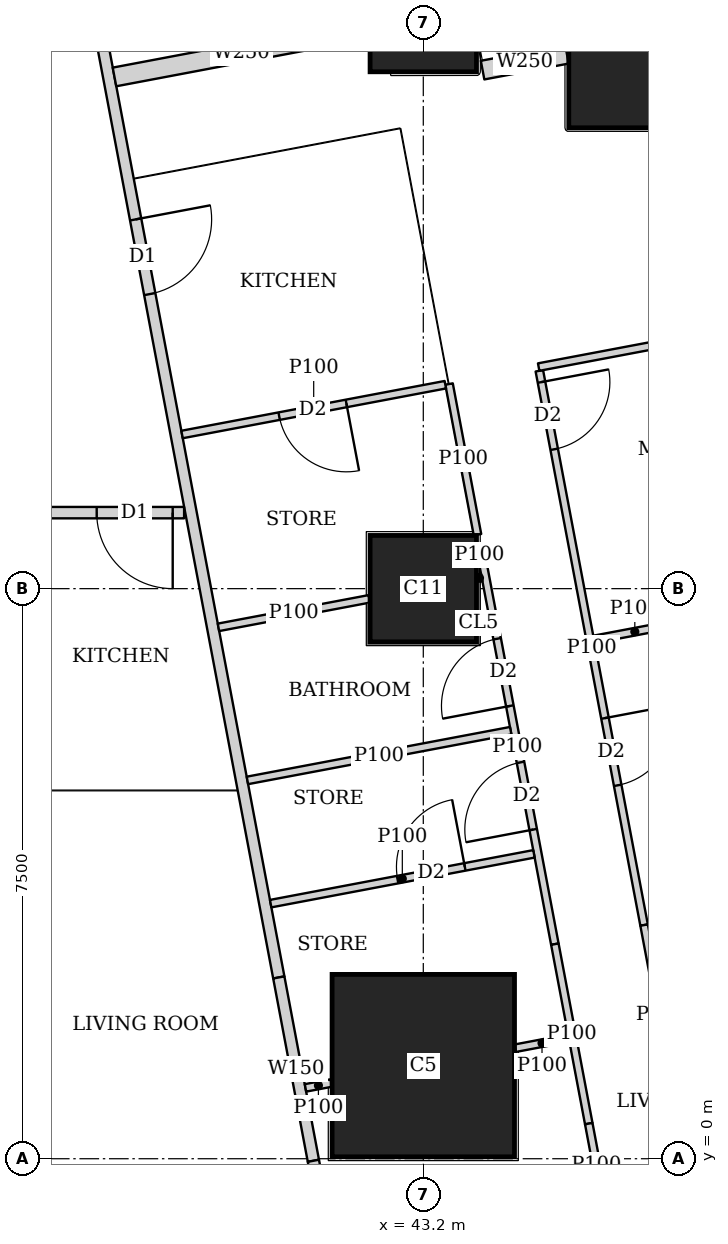
"""IFC4 building model, lengths in metres.
Left out: names, types, materials, properties, quantities, classifications, styles, units other than length and angle.
Written with IfcOpenShell. Run it as: python <this file> out.ifc"""

import sys

from ifc_helpers import new_model, si_unit, direction, frame, frame_2d, origin, origin_2d, place, context, subcontext, project, spatial, rectangle, extrude, element, fill, save


model = new_model("IFC4")
c1 = context("Model", 3, precision=1e-05, world=origin(), true_north=direction((0.0, 1.0)))
c2 = subcontext(c1, "Body", "Model", "MODEL_VIEW")
j1 = project(units=[si_unit("LENGTHUNIT", "METRE"), si_unit("PLANEANGLEUNIT", "RADIAN")], contexts=[c1])
p1 = place(None, origin())
s1 = spatial("IfcSite", under=j1, at=p1, CompositionType="ELEMENT")
p2 = place(p1, origin())
s2 = spatial("IfcBuilding", under=s1, at=p2, CompositionType="ELEMENT")
p3 = place(p2, frame((0.0, 0.0, 204.95)))
s3 = spatial("IfcBuildingStorey", under=s2, at=p3, CompositionType="ELEMENT", Elevation=204.95)
p4 = place(p3, frame((43.2, 1.225, 0.0), z_axis=(0.0, 0.0, 1.0), x_axis=(1.0, 0.0, 0.0)))
e1 = element("IfcColumn", 1, at=p4, inside=s3, PredefinedType="COLUMN", context=c2, shape_type="SweptSolid", body=[
    extrude(rectangle(XDim=2.4, YDim=2.4, at=origin_2d()), origin(), (0.0, 0.0, 1.0), 3.75),
])
for number, where, z_axis, x_axis in (
    (2, (43.2, 7.5, 0.0), (0.0, 0.0, 1.0), (1.0, 0.0, 0.0)),
    (3, (43.2, 15.0, 0.0), (0.0, 0.0, 1.0), (1.0, 0.0, 0.0)),
):
    element("IfcColumn", number, at=place(p3, frame(where, z_axis=z_axis, x_axis=x_axis)), inside=s3, PredefinedType="COLUMN", context=c2, shape_type="SweptSolid", body=[
        extrude(rectangle(XDim=1.4, YDim=1.4, at=origin_2d()), origin(), (0.0, 0.0, 1.0), 3.75),
    ])
p5 = place(p3, frame((46.314, 14.763, 0.0), z_axis=(0.0, 0.0, 1.0), x_axis=(1.0, 0.0, 0.0)))
e4 = element("IfcColumn", 4, at=p5, inside=s3, PredefinedType="COLUMN", context=c2, shape_type="SweptSolid", body=[
    extrude(rectangle(XDim=2.4, YDim=2.4, at=origin_2d()), origin(), (0.0, 0.0, 1.0), 3.75),
])
p6 = place(p3, frame((50.653, 2.703, 0.0), z_axis=(0.0, 0.0, 1.0), x_axis=(-0.185612026696, 0.982623109613, 0.0)))
e5 = element("IfcWall", 5, at=p6, inside=s3, PredefinedType="SOLIDWALL", context=c2, shape_type="SweptSolid", body=[
    extrude(rectangle(XDim=41.393, YDim=0.2, at=frame_2d((20.697, 0.0))), origin(), (0.0, 0.0, 1.0), 3.5),
])
p7 = place(p6, frame((1.633, 0.0, 0.9)))
e6 = element("IfcOpeningElement", 6, at=p7, cuts=e5, PredefinedType="OPENING", context=c2, shape_type="SweptSolid", body=[
    extrude(rectangle(XDim=1.8, YDim=1.5, at=frame_2d((0.9, 0.75))), frame((0.0, 0.11, 0.0), z_axis=(0.0, -1.0, 0.0), x_axis=(1.0, 0.0, 0.0)), (0.0, 0.0, 1.0), 0.22),
])
p8 = place(p6, frame((6.032, 0.0, 0.9)))
e7 = element("IfcOpeningElement", 7, at=p8, cuts=e5, PredefinedType="OPENING", context=c2, shape_type="SweptSolid", body=[
    extrude(rectangle(XDim=1.8, YDim=1.5, at=frame_2d((0.9, 0.75))), frame((0.0, 0.11, 0.0), z_axis=(0.0, -1.0, 0.0), x_axis=(1.0, 0.0, 0.0)), (0.0, 0.0, 1.0), 0.22),
])
p9 = place(p6, frame((9.848, 0.0, 0.9)))
e8 = element("IfcOpeningElement", 8, at=p9, cuts=e5, PredefinedType="OPENING", context=c2, shape_type="SweptSolid", body=[
    extrude(rectangle(XDim=1.8, YDim=1.5, at=frame_2d((0.9, 0.75))), frame((0.0, 0.11, 0.0), z_axis=(0.0, -1.0, 0.0), x_axis=(1.0, 0.0, 0.0)), (0.0, 0.0, 1.0), 0.22),
])
p10 = place(p6, frame((13.664, 0.0, 0.9)))
e9 = element("IfcOpeningElement", 9, at=p10, cuts=e5, PredefinedType="OPENING", context=c2, shape_type="SweptSolid", body=[
    extrude(rectangle(XDim=1.8, YDim=1.5, at=frame_2d((0.9, 0.75))), frame((0.0, 0.11, 0.0), z_axis=(0.0, -1.0, 0.0), x_axis=(1.0, 0.0, 0.0)), (0.0, 0.0, 1.0), 0.22),
])
p11 = place(p6, frame((17.481, 0.0, 0.9)))
e10 = element("IfcOpeningElement", 10, at=p11, cuts=e5, PredefinedType="OPENING", context=c2, shape_type="SweptSolid", body=[
    extrude(rectangle(XDim=1.8, YDim=1.5, at=frame_2d((0.9, 0.75))), frame((0.0, 0.11, 0.0), z_axis=(0.0, -1.0, 0.0), x_axis=(1.0, 0.0, 0.0)), (0.0, 0.0, 1.0), 0.22),
])
p12 = place(p6, frame((21.297, 0.0, 0.9)))
e11 = element("IfcOpeningElement", 11, at=p12, cuts=e5, PredefinedType="OPENING", context=c2, shape_type="SweptSolid", body=[
    extrude(rectangle(XDim=1.8, YDim=1.5, at=frame_2d((0.9, 0.75))), frame((0.0, 0.11, 0.0), z_axis=(0.0, -1.0, 0.0), x_axis=(1.0, 0.0, 0.0)), (0.0, 0.0, 1.0), 0.22),
])
p13 = place(p6, frame((25.113, 0.0, 0.9)))
e12 = element("IfcOpeningElement", 12, at=p13, cuts=e5, PredefinedType="OPENING", context=c2, shape_type="SweptSolid", body=[
    extrude(rectangle(XDim=1.8, YDim=1.5, at=frame_2d((0.9, 0.75))), frame((0.0, 0.11, 0.0), z_axis=(0.0, -1.0, 0.0), x_axis=(1.0, 0.0, 0.0)), (0.0, 0.0, 1.0), 0.22),
])
p14 = place(p6, frame((28.93, 0.0, 0.9)))
e13 = element("IfcOpeningElement", 13, at=p14, cuts=e5, PredefinedType="OPENING", context=c2, shape_type="SweptSolid", body=[
    extrude(rectangle(XDim=1.8, YDim=1.5, at=frame_2d((0.9, 0.75))), frame((0.0, 0.11, 0.0), z_axis=(0.0, -1.0, 0.0), x_axis=(1.0, 0.0, 0.0)), (0.0, 0.0, 1.0), 0.22),
])
p15 = place(p6, frame((32.746, 0.0, 0.9)))
e14 = element("IfcOpeningElement", 14, at=p15, cuts=e5, PredefinedType="OPENING", context=c2, shape_type="SweptSolid", body=[
    extrude(rectangle(XDim=1.8, YDim=1.5, at=frame_2d((0.9, 0.75))), frame((0.0, 0.11, 0.0), z_axis=(0.0, -1.0, 0.0), x_axis=(1.0, 0.0, 0.0)), (0.0, 0.0, 1.0), 0.22),
])
p16 = place(p6, frame((36.481, 0.0, 0.9)))
e15 = element("IfcOpeningElement", 15, at=p16, cuts=e5, PredefinedType="OPENING", context=c2, shape_type="SweptSolid", body=[
    extrude(rectangle(XDim=1.8, YDim=1.5, at=frame_2d((0.9, 0.75))), frame((0.0, 0.11, 0.0), z_axis=(0.0, -1.0, 0.0), x_axis=(1.0, 0.0, 0.0)), (0.0, 0.0, 1.0), 0.22),
])
p17 = place(p3, frame((40.053, 8.5, 0.0), z_axis=(0.0, 0.0, 1.0), x_axis=(-1.0, 0.0, 0.0)))
e16 = element("IfcWall", 16, at=p17, inside=s3, PredefinedType="SOLIDWALL", context=c2, shape_type="SweptSolid", body=[
    extrude(rectangle(XDim=31.052, YDim=0.15, at=frame_2d((15.526, 0.0))), origin(), (0.0, 0.0, 1.0), 3.5),
])
p18 = place(p17, frame((29.178, 0.0, 0.0)))
e17 = element("IfcOpeningElement", 17, at=p18, cuts=e16, PredefinedType="OPENING", context=c2, shape_type="SweptSolid", body=[
    extrude(rectangle(XDim=1.0, YDim=2.1, at=frame_2d((0.5, 1.05))), frame((0.0, 0.085, 0.0), z_axis=(0.0, -1.0, 0.0), x_axis=(1.0, 0.0, 0.0)), (0.0, 0.0, 1.0), 0.17),
])
p19 = place(p17, frame((19.953, 0.0, 0.0)))
e18 = element("IfcOpeningElement", 18, at=p19, cuts=e16, PredefinedType="OPENING", context=c2, shape_type="SweptSolid", body=[
    extrude(rectangle(XDim=1.0, YDim=2.1, at=frame_2d((0.5, 1.05))), frame((0.0, 0.085, 0.0), z_axis=(0.0, -1.0, 0.0), x_axis=(1.0, 0.0, 0.0)), (0.0, 0.0, 1.0), 0.17),
])
p20 = place(p17, frame((12.753, 0.0, 0.0)))
e19 = element("IfcOpeningElement", 19, at=p20, cuts=e16, PredefinedType="OPENING", context=c2, shape_type="SweptSolid", body=[
    extrude(rectangle(XDim=1.0, YDim=2.1, at=frame_2d((0.5, 1.05))), frame((0.0, 0.085, 0.0), z_axis=(0.0, -1.0, 0.0), x_axis=(1.0, 0.0, 0.0)), (0.0, 0.0, 1.0), 0.17),
])
p21 = place(p17, frame((0.15, 0.0, 0.0)))
e20 = element("IfcOpeningElement", 20, at=p21, cuts=e16, PredefinedType="OPENING", context=c2, shape_type="SweptSolid", body=[
    extrude(rectangle(XDim=1.0, YDim=2.1, at=frame_2d((0.5, 1.05))), frame((0.0, 0.085, 0.0), z_axis=(0.0, -1.0, 0.0), x_axis=(1.0, 0.0, 0.0)), (0.0, 0.0, 1.0), 0.17),
])
p22 = place(p3, frame((33.68, 42.723, 0.0), z_axis=(0.0, 0.0, 1.0), x_axis=(0.185601160014, -0.982625162207, 0.0)))
e21 = element("IfcWall", 21, at=p22, inside=s3, PredefinedType="SOLIDWALL", context=c2, shape_type="SweptSolid", body=[
    extrude(rectangle(XDim=41.051, YDim=0.15, at=frame_2d((20.526, 0.0))), origin(), (0.0, 0.0, 1.0), 2.5),
])
p23 = place(p22, frame((12.307, 0.0, 0.0)))
e22 = element("IfcOpeningElement", 22, at=p23, cuts=e21, PredefinedType="OPENING", context=c2, shape_type="SweptSolid", body=[
    extrude(rectangle(XDim=1.0, YDim=2.1, at=frame_2d((0.5, 1.05))), frame((0.0, 0.085, 0.0), z_axis=(0.0, -1.0, 0.0), x_axis=(1.0, 0.0, 0.0)), (0.0, 0.0, 1.0), 0.17),
])
p24 = place(p22, frame((16.123, 0.0, 0.0)))
e23 = element("IfcOpeningElement", 23, at=p24, cuts=e21, PredefinedType="OPENING", context=c2, shape_type="SweptSolid", body=[
    extrude(rectangle(XDim=1.0, YDim=2.1, at=frame_2d((0.5, 1.05))), frame((0.0, 0.085, 0.0), z_axis=(0.0, -1.0, 0.0), x_axis=(1.0, 0.0, 0.0)), (0.0, 0.0, 1.0), 0.17),
])
p25 = place(p22, frame((30.902, 0.0, 0.0)))
e24 = element("IfcOpeningElement", 24, at=p25, cuts=e21, PredefinedType="OPENING", context=c2, shape_type="SweptSolid", body=[
    extrude(rectangle(XDim=1.0, YDim=2.1, at=frame_2d((0.5, 1.05))), frame((0.0, 0.085, 0.0), z_axis=(0.0, -1.0, 0.0), x_axis=(1.0, 0.0, 0.0)), (0.0, 0.0, 1.0), 0.17),
])
p26 = place(p3, frame((41.299, 2.385, 0.0), z_axis=(0.0, 0.0, 1.0), x_axis=(0.18529731833, -0.982682504077, 0.0)))
e25 = element("IfcWall", 25, at=p26, inside=s3, PredefinedType="SOLIDWALL", context=c2, shape_type="SweptSolid", body=[
    extrude(rectangle(XDim=2.455, YDim=0.15, at=frame_2d((1.227, 0.0))), origin(), (0.0, 0.0, 1.0), 2.05),
])
p27 = place(p3, frame((41.754, -0.027, 0.0), z_axis=(0.0, 0.0, 1.0), x_axis=(0.186404157015, -0.982473149886, 0.0)))
e26 = element("IfcWall", 26, at=p27, inside=s3, PredefinedType="SOLIDWALL", context=c2, shape_type="SweptSolid", body=[
    extrude(rectangle(XDim=0.634, YDim=0.15, at=frame_2d((0.317, 0.0))), origin(), (0.0, 0.0, 1.0), 3.5),
])
p28 = place(p3, frame((44.727, 10.366, 0.0), z_axis=(0.0, 0.0, 1.0), x_axis=(0.185678775129, -0.982610498858, 0.0)))
e27 = element("IfcWall", 27, at=p28, inside=s3, PredefinedType="PARTITIONING", context=c2, shape_type="SweptSolid", body=[
    extrude(rectangle(XDim=7.421, YDim=0.1, at=frame_2d((3.71, 0.0))), origin(), (0.0, 0.0, 1.0), 3.5),
])
p29 = place(p28, frame((0.151, 0.0, 0.0)))
e28 = element("IfcOpeningElement", 28, at=p29, cuts=e27, PredefinedType="OPENING", context=c2, shape_type="SweptSolid", body=[
    extrude(rectangle(XDim=0.9, YDim=2.1, at=frame_2d((0.45, 1.05))), frame((0.0, 0.06, 0.0), z_axis=(0.0, -1.0, 0.0), x_axis=(1.0, 0.0, 0.0)), (0.0, 0.0, 1.0), 0.12),
])
p30 = place(p28, frame((4.65, 0.0, 0.0)))
e29 = element("IfcOpeningElement", 29, at=p30, cuts=e27, PredefinedType="OPENING", context=c2, shape_type="SweptSolid", body=[
    extrude(rectangle(XDim=0.9, YDim=2.1, at=frame_2d((0.45, 1.05))), frame((0.0, 0.06, 0.0), z_axis=(0.0, -1.0, 0.0), x_axis=(1.0, 0.0, 0.0)), (0.0, 0.0, 1.0), 0.12),
])
p31 = place(p3, frame((46.105, 3.074, 0.0), z_axis=(0.0, 0.0, 1.0), x_axis=(0.185631845838, -0.982619365681, 0.0)))
e30 = element("IfcWall", 30, at=p31, inside=s3, PredefinedType="PARTITIONING", context=c2, shape_type="SweptSolid", body=[
    extrude(rectangle(XDim=2.403, YDim=0.1, at=frame_2d((1.201, 0.0))), origin(), (0.0, 0.0, 1.0), 2.05),
])
p32 = place(p3, frame((43.539, 10.192, 0.0), z_axis=(0.0, 0.0, 1.0), x_axis=(0.185443145218, -0.982654995353, 0.0)))
e31 = element("IfcWall", 31, at=p32, inside=s3, PredefinedType="PARTITIONING", context=c2, shape_type="SweptSolid", body=[
    extrude(rectangle(XDim=2.017, YDim=0.1, at=frame_2d((1.008, 0.0))), origin(), (0.0, 0.0, 1.0), 3.5),
])
p33 = place(p3, frame((43.949, 8.02, 0.0), z_axis=(0.0, 0.0, 1.0), x_axis=(0.185656792073, -0.982614652627, 0.0)))
e32 = element("IfcWall", 32, at=p33, inside=s3, PredefinedType="PARTITIONING", context=c2, shape_type="SweptSolid", body=[
    extrude(rectangle(XDim=5.289, YDim=0.1, at=frame_2d((2.645, 0.0))), origin(), (0.0, 0.0, 1.0), 3.5),
])
p34 = place(p33, frame((1.2, 0.0, 0.0)))
e33 = element("IfcOpeningElement", 33, at=p34, cuts=e32, PredefinedType="OPENING", context=c2, shape_type="SweptSolid", body=[
    extrude(rectangle(XDim=0.9, YDim=2.1, at=frame_2d((0.45, 1.05))), frame((0.0, 0.06, 0.0), z_axis=(0.0, -1.0, 0.0), x_axis=(1.0, 0.0, 0.0)), (0.0, 0.0, 1.0), 0.12),
])
p35 = place(p33, frame((2.855, 0.0, 0.0)))
e34 = element("IfcOpeningElement", 34, at=p35, cuts=e32, PredefinedType="OPENING", context=c2, shape_type="SweptSolid", body=[
    extrude(rectangle(XDim=0.9, YDim=2.1, at=frame_2d((0.45, 1.05))), frame((0.0, 0.06, 0.0), z_axis=(0.0, -1.0, 0.0), x_axis=(1.0, 0.0, 0.0)), (0.0, 0.0, 1.0), 0.12),
])
p36 = place(p3, frame((44.931, 2.823, 0.0), z_axis=(0.0, 0.0, 1.0), x_axis=(0.185631845838, -0.982619365681, 0.0)))
e35 = element("IfcWall", 35, at=p36, inside=s3, PredefinedType="PARTITIONING", context=c2, shape_type="SweptSolid", body=[
    extrude(rectangle(XDim=2.403, YDim=0.1, at=frame_2d((1.201, 0.0))), origin(), (0.0, 0.0, 1.0), 2.05),
])
p37 = place(p3, frame((45.377, 0.462, 0.0), z_axis=(0.0, 0.0, 1.0), x_axis=(0.185513480919, -0.982641719243, 0.0)))
e36 = element("IfcWall", 36, at=p37, inside=s3, PredefinedType="PARTITIONING", context=c2, shape_type="SweptSolid", body=[
    extrude(rectangle(XDim=1.095, YDim=0.1, at=frame_2d((0.547, 0.0))), origin(), (0.0, 0.0, 1.0), 3.5),
])
p38 = place(p3, frame((48.943, 11.213, 0.0), z_axis=(0.0, 0.0, 1.0), x_axis=(-0.982633535512, -0.185556823879, 0.0)))
e37 = element("IfcWall", 37, at=p38, inside=s3, PredefinedType="PARTITIONING", context=c2, shape_type="SweptSolid", body=[
    extrude(rectangle(XDim=4.3, YDim=0.1, at=frame_2d((2.15, 0.0))), origin(), (0.0, 0.0, 1.0), 2.05),
])
p39 = place(p3, frame((46.52, 7.035, 0.0), z_axis=(0.0, 0.0, 1.0), x_axis=(-0.982620932907, -0.185623549726, 0.0)))
e38 = element("IfcWall", 38, at=p39, inside=s3, PredefinedType="PARTITIONING", context=c2, shape_type="SweptSolid", body=[
    extrude(rectangle(XDim=1.093, YDim=0.1, at=frame_2d((0.546, 0.0))), origin(), (0.0, 0.0, 1.0), 3.5),
])
p40 = place(p3, frame((43.49, 10.183, 0.0), z_axis=(0.0, 0.0, 1.0), x_axis=(-0.982588017646, -0.185797706064, 0.0)))
e39 = element("IfcWall", 39, at=p40, inside=s3, PredefinedType="PARTITIONING", context=c2, shape_type="SweptSolid", body=[
    extrude(rectangle(XDim=3.525, YDim=0.1, at=frame_2d((1.763, 0.0))), origin(), (0.0, 0.0, 1.0), 3.5),
])
p41 = place(p40, frame((1.325, 0.0, 0.0)))
e40 = element("IfcOpeningElement", 40, at=p41, cuts=e39, PredefinedType="OPENING", context=c2, shape_type="SweptSolid", body=[
    extrude(rectangle(XDim=0.9, YDim=2.1, at=frame_2d((0.45, 1.05))), frame((0.0, 0.06, 0.0), z_axis=(0.0, -1.0, 0.0), x_axis=(1.0, 0.0, 0.0)), (0.0, 0.0, 1.0), 0.12),
])
p42 = place(p3, frame((43.969, 7.646, 0.0), z_axis=(0.0, 0.0, 1.0), x_axis=(-0.983147034646, -0.182816597351, 0.0)))
e41 = element("IfcWall", 41, at=p42, inside=s3, PredefinedType="PARTITIONING", context=c2, shape_type="SweptSolid", body=[
    extrude(rectangle(XDim=0.06, YDim=0.1, at=frame_2d((0.03, 0.0))), origin(), (0.0, 0.0, 1.0), 3.5),
])
p43 = place(p3, frame((42.49, 7.366, 0.0), z_axis=(0.0, 0.0, 1.0), x_axis=(-0.982620917875, -0.185623629302, 0.0)))
e42 = element("IfcWall", 42, at=p43, inside=s3, PredefinedType="PARTITIONING", context=c2, shape_type="SweptSolid", body=[
    extrude(rectangle(XDim=2.02, YDim=0.1, at=frame_2d((1.01, 0.0))), origin(), (0.0, 0.0, 1.0), 3.5),
])
p44 = place(p3, frame((45.114, 1.587, 0.0), z_axis=(0.0, 0.0, 1.0), x_axis=(-0.982671022916, -0.185358195723, 0.0)))
e43 = element("IfcWall", 43, at=p44, inside=s3, PredefinedType="PARTITIONING", context=c2, shape_type="SweptSolid", body=[
    extrude(rectangle(XDim=0.717, YDim=0.1, at=frame_2d((0.358, 0.0))), origin(), (0.0, 0.0, 1.0), 2.05),
])
p45 = place(p3, frame((41.99, 0.996, 0.0), z_axis=(0.0, 0.0, 1.0), x_axis=(-0.982639822555, -0.185523527159, 0.0)))
e44 = element("IfcWall", 44, at=p45, inside=s3, PredefinedType="PARTITIONING", context=c2, shape_type="SweptSolid", body=[
    extrude(rectangle(XDim=0.346, YDim=0.1, at=frame_2d((0.173, 0.0))), origin(), (0.0, 0.0, 1.0), 2.05),
])
p46 = place(p3, frame((44.35, 5.631, 0.0), z_axis=(0.0, 0.0, 1.0), x_axis=(-0.982638553676, -0.185530247748, 0.0)))
e45 = element("IfcWall", 45, at=p46, inside=s3, PredefinedType="PARTITIONING", context=c2, shape_type="SweptSolid", body=[
    extrude(rectangle(XDim=3.525, YDim=0.1, at=frame_2d((1.763, 0.0))), origin(), (0.0, 0.0, 1.0), 3.5),
])
p47 = place(p3, frame((45.09, 14.531, 0.0), z_axis=(0.0, 0.0, 1.0), x_axis=(-0.982737354171, -0.185006196431, 0.0)))
e46 = element("IfcWall", 46, at=p47, inside=s3, PredefinedType="SOLIDWALL", context=c2, shape_type="SweptSolid", body=[
    extrude(rectangle(XDim=1.13, YDim=0.25, at=frame_2d((0.565, 0.0))), origin(), (0.0, 0.0, 1.0), 2.05),
])
p48 = place(p3, frame((42.476, 14.863, 0.0), z_axis=(0.0, 0.0, 1.0), x_axis=(-0.982603567712, -0.185715450942, 0.0)))
e47 = element("IfcWall", 47, at=p48, inside=s3, PredefinedType="SOLIDWALL", context=c2, shape_type="SweptSolid", body=[
    extrude(rectangle(XDim=3.398, YDim=0.25, at=frame_2d((1.699, 0.0))), origin(), (0.0, 0.0, 1.0), 3.5),
])
p49 = place(p3, frame((41.192, 3.356, 0.0), z_axis=(0.0, 0.0, 1.0), x_axis=(0.982588017646, 0.185797706064, 0.0)))
e48 = element("IfcWall", 48, at=p49, inside=s3, PredefinedType="PARTITIONING", context=c2, shape_type="SweptSolid", body=[
    extrude(rectangle(XDim=3.525, YDim=0.1, at=frame_2d((1.763, 0.0))), origin(), (0.0, 0.0, 1.0), 3.5),
])
p50 = place(p49, frame((1.7, 0.0, 0.0)))
e49 = element("IfcOpeningElement", 49, at=p50, cuts=e48, PredefinedType="OPENING", context=c2, shape_type="SweptSolid", body=[
    extrude(rectangle(XDim=0.9, YDim=2.1, at=frame_2d((0.45, 1.05))), frame((0.0, 0.06, 0.0), z_axis=(0.0, -1.0, 0.0), x_axis=(1.0, 0.0, 0.0)), (0.0, 0.0, 1.0), 0.12),
])
p51 = place(p21, origin())
e50 = element("IfcDoor", 50, at=p51, inside=s3, OperationType="SINGLE_SWING_LEFT", PredefinedType="DOOR", context=c2, shape_type="SweptSolid", body=[
    extrude(rectangle(XDim=1.0, YDim=2.1, at=frame_2d((0.5, 1.05))), frame((0.0, 0.025, 0.0), z_axis=(0.0, -1.0, 0.0), x_axis=(1.0, 0.0, 0.0)), (0.0, 0.0, 1.0), 0.05),
])
fill(e20, e50)
p52 = place(p29, origin())
e51 = element("IfcDoor", 51, at=p52, inside=s3, OperationType="SINGLE_SWING_LEFT", PredefinedType="DOOR", context=c2, shape_type="SweptSolid", body=[
    extrude(rectangle(XDim=0.9, YDim=2.1, at=frame_2d((0.45, 1.05))), frame((0.0, 0.025, 0.0), z_axis=(0.0, -1.0, 0.0), x_axis=(1.0, 0.0, 0.0)), (0.0, 0.0, 1.0), 0.05),
])
fill(e28, e51)
p53 = place(p30, origin())
e52 = element("IfcDoor", 52, at=p53, inside=s3, OperationType="SINGLE_SWING_LEFT", PredefinedType="DOOR", context=c2, shape_type="SweptSolid", body=[
    extrude(rectangle(XDim=0.9, YDim=2.1, at=frame_2d((0.45, 1.05))), frame((0.0, 0.025, 0.0), z_axis=(0.0, -1.0, 0.0), x_axis=(1.0, 0.0, 0.0)), (0.0, 0.0, 1.0), 0.05),
])
fill(e29, e52)
p54 = place(p34, origin())
e53 = element("IfcDoor", 53, at=p54, inside=s3, OperationType="SINGLE_SWING_LEFT", PredefinedType="DOOR", context=c2, shape_type="SweptSolid", body=[
    extrude(rectangle(XDim=0.9, YDim=2.1, at=frame_2d((0.45, 1.05))), frame((0.0, 0.025, 0.0), z_axis=(0.0, -1.0, 0.0), x_axis=(1.0, 0.0, 0.0)), (0.0, 0.0, 1.0), 0.05),
])
fill(e33, e53)
p55 = place(p35, origin())
e54 = element("IfcDoor", 54, at=p55, inside=s3, OperationType="SINGLE_SWING_LEFT", PredefinedType="DOOR", context=c2, shape_type="SweptSolid", body=[
    extrude(rectangle(XDim=0.9, YDim=2.1, at=frame_2d((0.45, 1.05))), frame((0.0, 0.025, 0.0), z_axis=(0.0, -1.0, 0.0), x_axis=(1.0, 0.0, 0.0)), (0.0, 0.0, 1.0), 0.05),
])
fill(e34, e54)
p56 = place(p25, origin())
e55 = element("IfcDoor", 55, at=p56, inside=s3, OperationType="SINGLE_SWING_LEFT", PredefinedType="DOOR", context=c2, shape_type="SweptSolid", body=[
    extrude(rectangle(XDim=1.0, YDim=2.1, at=frame_2d((0.5, 1.05))), frame((0.0, 0.025, 0.0), z_axis=(0.0, -1.0, 0.0), x_axis=(1.0, 0.0, 0.0)), (0.0, 0.0, 1.0), 0.05),
])
fill(e24, e55)
p57 = place(p41, origin())
e56 = element("IfcDoor", 56, at=p57, inside=s3, OperationType="SINGLE_SWING_LEFT", PredefinedType="DOOR", context=c2, shape_type="SweptSolid", body=[
    extrude(rectangle(XDim=0.9, YDim=2.1, at=frame_2d((0.45, 1.05))), frame((0.0, 0.025, 0.0), z_axis=(0.0, -1.0, 0.0), x_axis=(1.0, 0.0, 0.0)), (0.0, 0.0, 1.0), 0.05),
])
fill(e40, e56)
p58 = place(p50, origin())
e57 = element("IfcDoor", 57, at=p58, inside=s3, OperationType="SINGLE_SWING_RIGHT", PredefinedType="DOOR", context=c2, shape_type="SweptSolid", body=[
    extrude(rectangle(XDim=0.9, YDim=2.1, at=frame_2d((0.45, 1.05))), frame((0.0, 0.025, 0.0), z_axis=(0.0, -1.0, 0.0), x_axis=(1.0, 0.0, 0.0)), (0.0, 0.0, 1.0), 0.05),
])
fill(e49, e57)
save(model, sys.argv[1])
